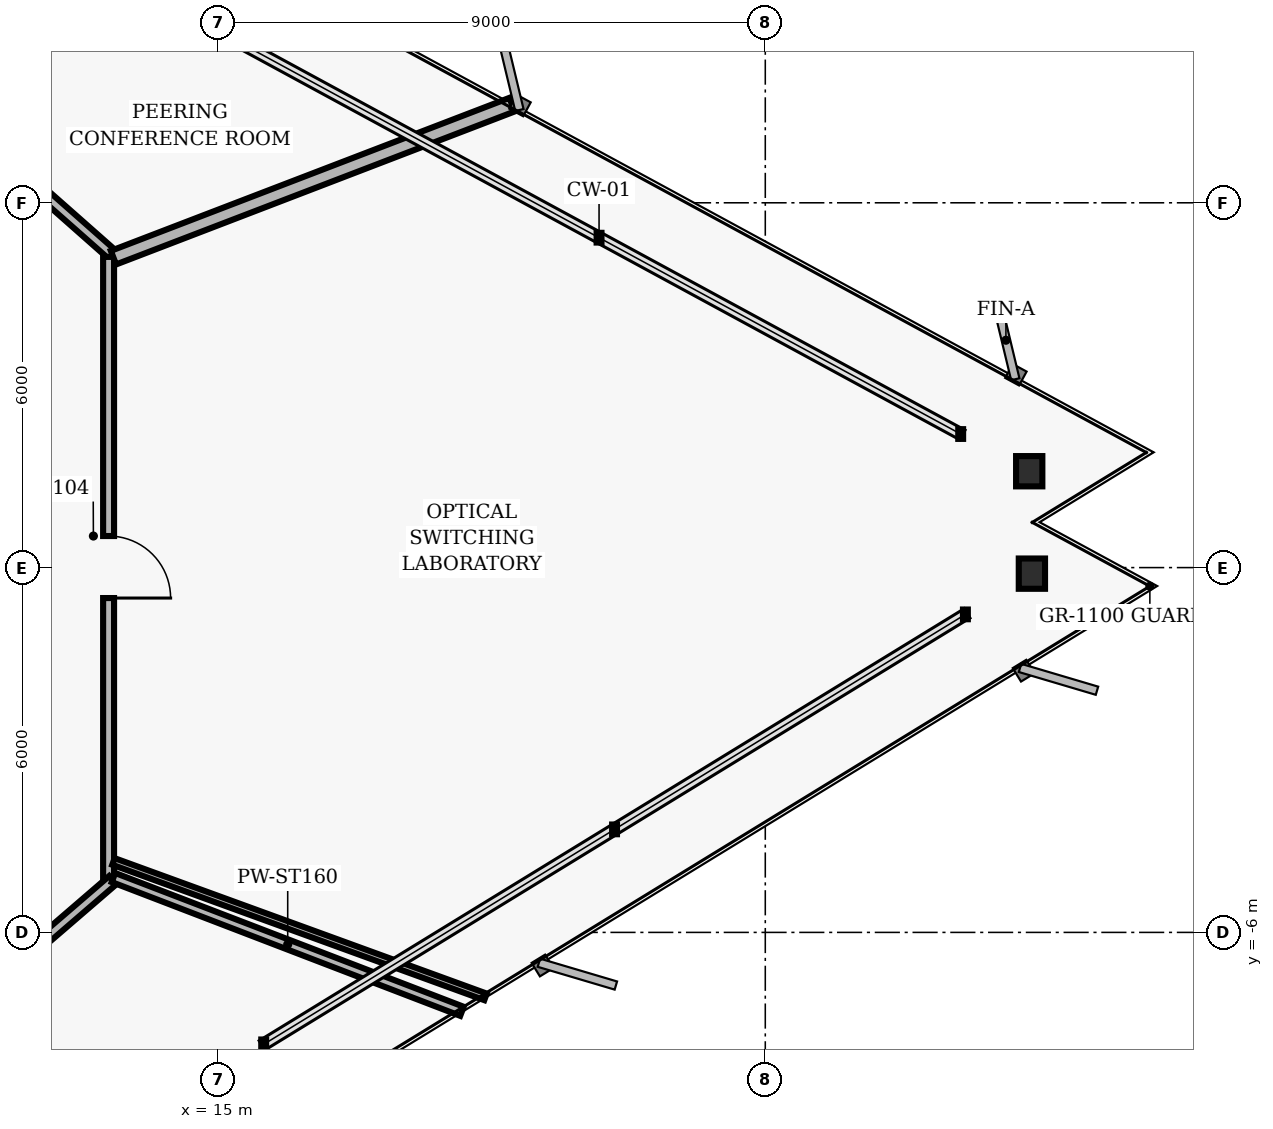
"""IFC4 building model, lengths in metres.
Left out: names, types, materials, properties, quantities, classifications, styles, units other than length and angle.
Written with IfcOpenShell. Run it as: python <this file> out.ifc"""

import sys

from ifc_helpers import new_model, si_unit, direction, frame, frame_2d, origin, origin_2d, place, context, subcontext, project, spatial, rectangle, i_section, extrude, element, fill, save


model = new_model("IFC4")
c1 = context("Model", 3, precision=1e-05, world=origin(), true_north=direction((0.0, 1.0)))
c2 = subcontext(c1, "Body", "Model", "MODEL_VIEW")
j1 = project(units=[si_unit("LENGTHUNIT", "METRE"), si_unit("PLANEANGLEUNIT", "RADIAN")], contexts=[c1])
p1 = place(None, origin())
s1 = spatial("IfcSite", under=j1, at=p1, CompositionType="ELEMENT")
p2 = place(p1, origin())
s2 = spatial("IfcBuilding", under=s1, at=p2, CompositionType="ELEMENT")
p3 = place(p2, frame((0.0, 0.0, 25.6)))
s3 = spatial("IfcBuildingStorey", under=s2, at=p3, CompositionType="ELEMENT", Elevation=25.6)
for number, where, z_axis, x_axis in (
    (1, (28.341, 1.585, 0.0), (0.0, 0.0, 1.0), (1.0, 0.0, 0.0)),
    (2, (28.385, -0.1, 0.0), (0.0, 0.0, 1.0), (1.0, 0.0, 0.0)),
):
    element("IfcColumn", number, at=place(p3, frame(where, z_axis=z_axis, x_axis=x_axis)), inside=s3, PredefinedType="COLUMN", context=c2, shape_type="SweptSolid", body=[
        extrude(i_section(OverallWidth=0.432, OverallDepth=0.498, WebThickness=0.056, FlangeThickness=0.089, FilletRadius=0.025, at=origin_2d()), origin(), (0.0, 0.0, 1.0), 3.36),
    ])
p4 = place(p3, frame((8.567, 9.29, 0.0), z_axis=(0.0, 0.0, 1.0), x_axis=(0.749626463267, -0.66186113768, 0.0)))
e3 = element("IfcWall", 3, at=p4, inside=s3, PredefinedType="PARTITIONING", context=c2, shape_type="SweptSolid", body=[
    extrude(rectangle(XDim=6.27, YDim=0.18, at=frame_2d((3.135, 0.0))), origin(), (0.0, 0.0, 1.0), 2.587),
])
p5 = place(p4, frame((2.895, 0.0, 0.0)))
e4 = element("IfcOpeningElement", 4, at=p5, cuts=e3, PredefinedType="OPENING", context=c2, shape_type="SweptSolid", body=[
    extrude(rectangle(XDim=0.96, YDim=2.02, at=frame_2d((0.48, 1.01))), frame((0.0, 0.1, 0.0), z_axis=(0.0, -1.0, 0.0), x_axis=(1.0, 0.0, 0.0)), (0.0, 0.0, 1.0), 0.2),
])
p6 = place(p3, frame((13.2, 5.11, 0.0), z_axis=(0.0, 0.0, 1.0), x_axis=(0.0, -1.0, 0.0)))
e5 = element("IfcWall", 5, at=p6, inside=s3, PredefinedType="PARTITIONING", context=c2, shape_type="SweptSolid", body=[
    extrude(rectangle(XDim=10.22, YDim=0.18, at=frame_2d((5.11, 0.0))), origin(), (0.0, 0.0, 1.0), 3.073),
])
p7 = place(p6, frame((4.591, 0.0, 0.0)))
e6 = element("IfcOpeningElement", 6, at=p7, cuts=e5, PredefinedType="OPENING", context=c2, shape_type="SweptSolid", body=[
    extrude(rectangle(XDim=1.02, YDim=2.02, at=frame_2d((0.51, 1.01))), frame((0.0, 0.1, 0.0), z_axis=(0.0, -1.0, 0.0), x_axis=(1.0, 0.0, 0.0)), (0.0, 0.0, 1.0), 0.2),
])
p8 = place(p3, frame((13.268, -5.141, 0.0), z_axis=(0.0, 0.0, 1.0), x_axis=(-0.757534501725, -0.65279512766, 0.0)))
e7 = element("IfcWall", 7, at=p8, inside=s3, PredefinedType="PARTITIONING", context=c2, shape_type="SweptSolid", body=[
    extrude(rectangle(XDim=6.385, YDim=0.18, at=frame_2d((3.192, 0.0))), origin(), (0.0, 0.0, 1.0), 2.587),
])
p9 = place(p3, frame((13.28, -5.098, 0.0), z_axis=(0.0, 0.0, 1.0), x_axis=(0.933574999212, -0.358382087787, 0.0)))
e8 = element("IfcWall", 8, at=p9, inside=s3, PredefinedType="PARTITIONING", context=c2, shape_type="SweptSolid", body=[
    extrude(rectangle(XDim=6.139, YDim=0.16, at=frame_2d((3.07, 0.0))), origin(), (0.0, 0.0, 1.0), 3.073),
])
p10 = place(p3, frame((13.28, -4.833, 0.0), z_axis=(0.0, 0.0, 1.0), x_axis=(0.939690475906, -0.342026036278, 0.0)))
e9 = element("IfcWall", 9, at=p10, inside=s3, PredefinedType="MOVABLE", context=c2, shape_type="SweptSolid", body=[
    extrude(rectangle(XDim=6.511, YDim=0.115, at=frame_2d((3.256, 0.0))), origin(), (0.0, 0.0, 1.0), 3.073),
])
p11 = place(p3, frame((13.28, 5.098, 0.0), z_axis=(0.0, 0.0, 1.0), x_axis=(0.933577510578, 0.358375545681, 0.0)))
e10 = element("IfcWall", 10, at=p11, inside=s3, PredefinedType="PARTITIONING", context=c2, shape_type="SweptSolid", body=[
    extrude(rectangle(XDim=7.021, YDim=0.24, at=frame_2d((3.511, 0.0))), origin(), (0.0, 0.0, 1.0), 3.073),
])
p12 = place(p7, origin())
e11 = element("IfcDoor", 11, at=p12, inside=s3, OperationType="SINGLE_SWING_RIGHT", PredefinedType="DOOR", context=c2, shape_type="SweptSolid", body=[
    extrude(rectangle(XDim=1.02, YDim=2.02, at=frame_2d((0.51, 1.01))), frame((0.0, 0.025, 0.0), z_axis=(0.0, -1.0, 0.0), x_axis=(1.0, 0.0, 0.0)), (0.0, 0.0, 1.0), 0.05),
])
fill(e6, e11)
save(model, sys.argv[1])
